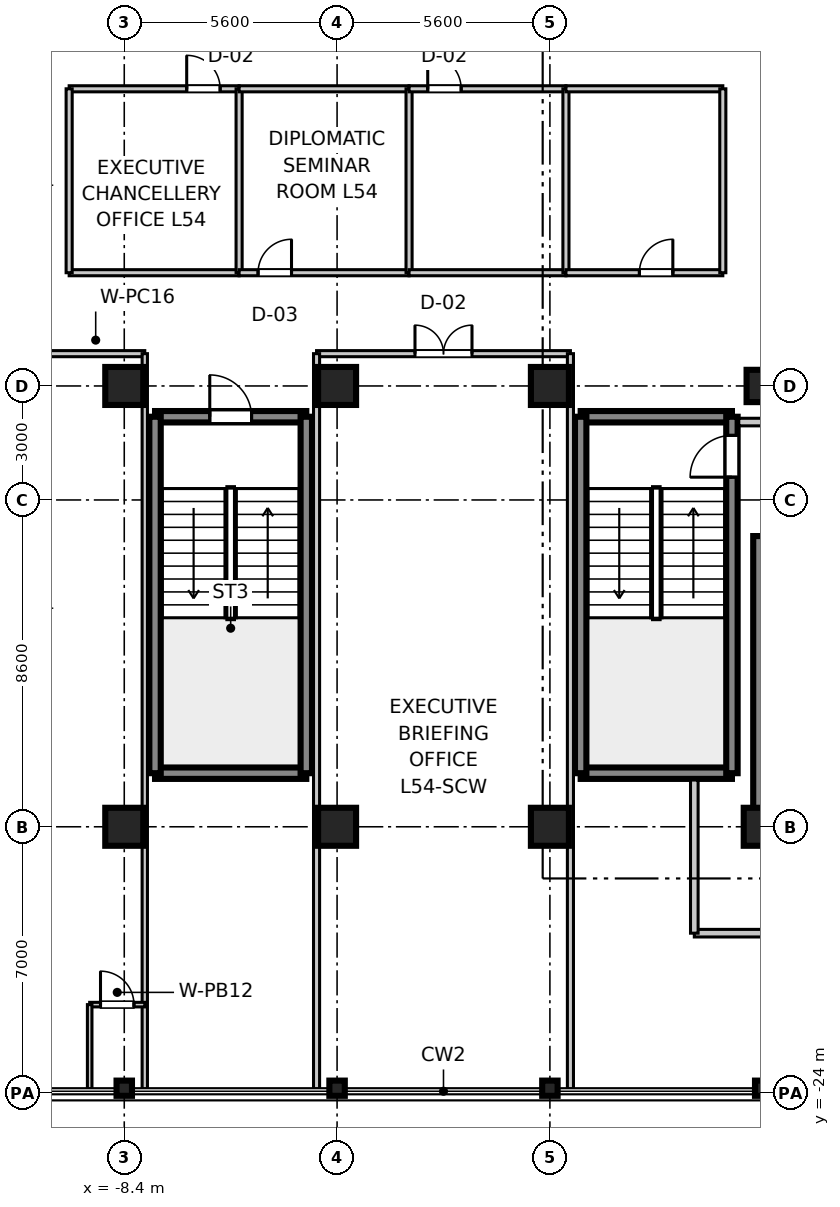
"""IFC4 building model, lengths in metres.
Left out: names, types, materials, properties, quantities, classifications, styles, units other than length and angle.
Written with IfcOpenShell. Run it as: python <this file> out.ifc"""

import sys

from ifc_helpers import new_model, si_unit, direction, frame, frame_2d, origin, origin_2d, place, context, subcontext, project, spatial, rectangle, i_section, extrude, source, transform, mapped, element, fill, save


model = new_model("IFC4")
c1 = context("Model", 3, precision=1e-05, world=origin(), true_north=direction((0.0, 1.0)))
c2 = subcontext(c1, "Body", "Model", "MODEL_VIEW")
j1 = project(units=[si_unit("LENGTHUNIT", "METRE"), si_unit("PLANEANGLEUNIT", "RADIAN")], contexts=[c1])
p1 = place(None, origin())
s1 = spatial("IfcSite", under=j1, at=p1, CompositionType="ELEMENT")
p2 = place(p1, origin())
s2 = spatial("IfcBuilding", under=s1, at=p2, CompositionType="ELEMENT")
p3 = place(p2, frame((0.0, 0.0, 212.3)))
s3 = spatial("IfcBuildingStorey", under=s2, at=p3, CompositionType="ELEMENT", Elevation=212.3)
m1 = source(origin(), c2, "Body", "SweptSolid", [
    extrude(rectangle(XDim=1.0, YDim=1.0, at=origin_2d()), origin(), (0.0, 0.0, 1.0), 3.655),
])
for number, where, z_axis, x_axis in (
    (1, (-8.4, -17.0, 0.0), (0.0, 0.0, 1.0), (1.0, 0.0, 0.0)),
    (2, (-8.4, -5.4, 0.0), (0.0, 0.0, 1.0), (1.0, 0.0, 0.0)),
    (3, (-2.8, -17.0, 0.0), (0.0, 0.0, 1.0), (1.0, 0.0, 0.0)),
    (4, (-2.8, -5.4, 0.0), (0.0, 0.0, 1.0), (1.0, 0.0, 0.0)),
    (5, (2.8, -17.0, 0.0), (0.0, 0.0, 1.0), (1.0, 0.0, 0.0)),
    (6, (2.8, -5.4, 0.0), (0.0, 0.0, 1.0), (1.0, 0.0, 0.0)),
    (7, (8.4, -17.0, 0.0), (0.0, 0.0, 1.0), (1.0, 0.0, 0.0)),
):
    element("IfcColumn", number, at=place(p3, frame(where, z_axis=z_axis, x_axis=x_axis)), inside=s3, PredefinedType="COLUMN", context=c2, shape_type="MappedRepresentation", body=[
        mapped(m1, transform((0.0, 0.0, 0.0), scale=1.0)),
    ])
m2 = source(origin(), c2, "Body", "SweptSolid", [
    extrude(rectangle(XDim=0.85, YDim=0.85, at=origin_2d()), origin(), (0.0, 0.0, 1.0), 3.655),
])
p4 = place(p3, frame((8.4, -5.4, 0.0), z_axis=(0.0, 0.0, 1.0), x_axis=(1.0, 0.0, 0.0)))
e8 = element("IfcColumn", 8, at=p4, inside=s3, PredefinedType="PILASTER", context=c2, shape_type="MappedRepresentation", body=[
    mapped(m2, transform((0.0, 0.0, 0.0), scale=1.0)),
])
m3 = source(origin(), c2, "Body", "SweptSolid", [
    extrude(i_section(OverallWidth=0.401, OverallDepth=0.406, WebThickness=0.016, FlangeThickness=0.025, at=origin_2d()), origin(), (0.0, 0.0, 1.0), 3.655),
])
for number, where, z_axis, x_axis in (
    (9, (-8.4, -23.88, 0.0), (0.0, 0.0, 1.0), (0.0, 1.0, 0.0)),
    (10, (-2.8, -23.88, 0.0), (0.0, 0.0, 1.0), (0.0, 1.0, 0.0)),
    (11, (2.8, -23.88, 0.0), (0.0, 0.0, 1.0), (0.0, 1.0, 0.0)),
    (12, (8.4, -23.88, 0.0), (0.0, 0.0, 1.0), (0.0, 1.0, 0.0)),
):
    element("IfcColumn", number, at=place(p3, frame(where, z_axis=z_axis, x_axis=x_axis)), inside=s3, PredefinedType="COLUMN", context=c2, shape_type="MappedRepresentation", body=[
        mapped(m3, transform((0.0, 0.0, 0.0), scale=1.0)),
    ])
m4 = source(origin(), c2, "Body", "SweptSolid", [
    extrude(rectangle(XDim=7.65, YDim=0.5, at=frame_2d((3.825, 0.0))), origin(), (0.0, 0.0, 1.0), 3.41),
])
p5 = place(p3, frame((8.4, -17.0, 0.0), z_axis=(0.0, 0.0, 1.0), x_axis=(0.0, 1.0, 0.0)))
e13 = element("IfcWall", 13, at=p5, inside=s3, PredefinedType="SHEAR", context=c2, shape_type="MappedRepresentation", body=[
    mapped(m4, transform((0.0, 0.0, 0.0), scale=1.0)),
])
m5 = source(origin(), c2, "Body", "SweptSolid", [
    extrude(rectangle(XDim=3.98, YDim=0.3, at=frame_2d((1.99, 0.0))), origin(), (0.0, 0.0, 1.0), 3.41),
])
for number, where, z_axis, x_axis in (
    (14, (3.61, -15.59, 0.0), (0.0, 0.0, 1.0), (1.0, 0.0, 0.0)),
    (15, (3.61, -6.21, 0.0), (0.0, 0.0, 1.0), (1.0, 0.0, 0.0)),
):
    element("IfcWall", number, at=place(p3, frame(where, z_axis=z_axis, x_axis=x_axis)), inside=s3, PredefinedType="SHEAR", context=c2, shape_type="MappedRepresentation", body=[
        mapped(m5, transform((0.0, 0.0, 0.0), scale=1.0)),
    ])
m6 = source(origin(), c2, "Body", "SweptSolid", [
    extrude(rectangle(XDim=9.38, YDim=0.3, at=frame_2d((4.69, 0.0))), origin(), (0.0, 0.0, 1.0), 3.41),
])
p6 = place(p3, frame((3.61, -15.59, 0.0), z_axis=(0.0, 0.0, 1.0), x_axis=(0.0, 1.0, 0.0)))
e16 = element("IfcWall", 16, at=p6, inside=s3, PredefinedType="SHEAR", context=c2, shape_type="MappedRepresentation", body=[
    mapped(m6, transform((0.0, 0.0, 0.0), scale=1.0)),
])
p7 = place(p3, frame((7.59, -15.59, 0.0), z_axis=(0.0, 0.0, 1.0), x_axis=(0.0, 1.0, 0.0)))
e17 = element("IfcWall", 17, at=p7, inside=s3, PredefinedType="SHEAR", context=c2, shape_type="MappedRepresentation", body=[
    mapped(m6, transform((0.0, 0.0, 0.0), scale=1.0)),
])
p8 = place(p7, frame((7.79, 0.0, 0.0)))
e18 = element("IfcOpeningElement", 18, at=p8, cuts=e17, PredefinedType="OPENING", context=c2, shape_type="SweptSolid", body=[
    extrude(rectangle(XDim=1.1, YDim=2.15, at=frame_2d((0.55, 1.075))), frame((0.0, 0.16, 0.0), z_axis=(0.0, -1.0, 0.0), x_axis=(1.0, 0.0, 0.0)), (0.0, 0.0, 1.0), 0.32),
])
p9 = place(p3, frame((-7.59, -15.59, 0.0), z_axis=(0.0, 0.0, 1.0), x_axis=(1.0, 0.0, 0.0)))
e19 = element("IfcWall", 19, at=p9, inside=s3, PredefinedType="SHEAR", context=c2, shape_type="MappedRepresentation", body=[
    mapped(m5, transform((0.0, 0.0, 0.0), scale=1.0)),
])
p10 = place(p3, frame((-7.59, -6.21, 0.0), z_axis=(0.0, 0.0, 1.0), x_axis=(1.0, 0.0, 0.0)))
e20 = element("IfcWall", 20, at=p10, inside=s3, PredefinedType="SHEAR", context=c2, shape_type="MappedRepresentation", body=[
    mapped(m5, transform((0.0, 0.0, 0.0), scale=1.0)),
])
p11 = place(p10, frame((1.44, 0.0, 0.0)))
e21 = element("IfcOpeningElement", 21, at=p11, cuts=e20, PredefinedType="OPENING", context=c2, shape_type="SweptSolid", body=[
    extrude(rectangle(XDim=1.1, YDim=2.15, at=frame_2d((0.55, 1.075))), frame((0.0, 0.16, 0.0), z_axis=(0.0, -1.0, 0.0), x_axis=(1.0, 0.0, 0.0)), (0.0, 0.0, 1.0), 0.32),
])
for number, where, z_axis, x_axis in (
    (22, (-7.59, -15.59, 0.0), (0.0, 0.0, 1.0), (0.0, 1.0, 0.0)),
    (23, (-3.61, -15.59, 0.0), (0.0, 0.0, 1.0), (0.0, 1.0, 0.0)),
):
    element("IfcWall", number, at=place(p3, frame(where, z_axis=z_axis, x_axis=x_axis)), inside=s3, PredefinedType="SHEAR", context=c2, shape_type="MappedRepresentation", body=[
        mapped(m6, transform((0.0, 0.0, 0.0), scale=1.0)),
    ])
m7 = source(origin(), c2, "Body", "SweptSolid", [
    extrude(rectangle(XDim=5.82, YDim=0.2, at=frame_2d((2.91, 0.0))), origin(), (0.0, 0.0, 1.0), 2.75),
])
p12 = place(p3, frame((6.6, -19.8, 0.0), z_axis=(0.0, 0.0, 1.0), x_axis=(1.0, 0.0, 0.0)))
e24 = element("IfcWall", 24, at=p12, inside=s3, PredefinedType="PARTITIONING", context=c2, shape_type="MappedRepresentation", body=[
    mapped(m7, transform((0.0, 0.0, 0.0), scale=1.0)),
])
m8 = source(origin(), c2, "Body", "SweptSolid", [
    extrude(rectangle(XDim=4.03, YDim=0.2, at=frame_2d((2.015, 0.0))), origin(), (0.0, 0.0, 1.0), 2.75),
])
p13 = place(p3, frame((6.6, -19.8, 0.0), z_axis=(0.0, 0.0, 1.0), x_axis=(0.0, 1.0, 0.0)))
e25 = element("IfcWall", 25, at=p13, inside=s3, PredefinedType="PARTITIONING", context=c2, shape_type="MappedRepresentation", body=[
    mapped(m8, transform((0.0, 0.0, 0.0), scale=1.0)),
])
m9 = source(origin(), c2, "Body", "SweptSolid", [
    extrude(rectangle(XDim=0.97, YDim=0.2, at=frame_2d((0.485, 0.0))), origin(), (0.0, 0.0, 1.0), 2.75),
])
p14 = place(p3, frame((7.77, -6.35, 0.0), z_axis=(0.0, 0.0, 1.0), x_axis=(1.0, 0.0, 0.0)))
e26 = element("IfcWall", 26, at=p14, inside=s3, PredefinedType="PARTITIONING", context=c2, shape_type="MappedRepresentation", body=[
    mapped(m9, transform((0.0, 0.0, 0.0), scale=1.0)),
])
m10 = source(origin(), c2, "Body", "SweptSolid", [
    extrude(rectangle(XDim=4.14, YDim=0.16, at=frame_2d((2.07, 0.0))), origin(), (0.0, 0.0, 1.0), 2.75),
])
p15 = place(p3, frame((-12.0, -4.55, 0.0), z_axis=(0.0, 0.0, 1.0), x_axis=(1.0, 0.0, 0.0)))
e27 = element("IfcWall", 27, at=p15, inside=s3, PredefinedType="PARTITIONING", context=c2, shape_type="MappedRepresentation", body=[
    mapped(m10, transform((0.0, 0.0, 0.0), scale=1.0)),
])
p16 = place(p15, frame((0.457, 0.0, 0.0)))
e28 = element("IfcOpeningElement", 28, at=p16, cuts=e27, PredefinedType="OPENING", context=c2, shape_type="SweptSolid", body=[
    extrude(rectangle(XDim=0.95, YDim=2.1, at=frame_2d((0.475, 1.05))), frame((0.0, 0.09, 0.0), z_axis=(0.0, -1.0, 0.0), x_axis=(1.0, 0.0, 0.0)), (0.0, 0.0, 1.0), 0.18),
])
m11 = source(origin(), c2, "Body", "SweptSolid", [
    extrude(rectangle(XDim=19.35, YDim=0.14, at=frame_2d((9.675, 0.0))), origin(), (0.0, 0.0, 1.0), 2.75),
])
p17 = place(p3, frame((-7.86, -23.9, 0.0), z_axis=(0.0, 0.0, 1.0), x_axis=(0.0, 1.0, 0.0)))
e29 = element("IfcWall", 29, at=p17, inside=s3, PredefinedType="PARTITIONING", context=c2, shape_type="MappedRepresentation", body=[
    mapped(m11, transform((0.0, 0.0, 0.0), scale=1.0)),
])
m12 = source(origin(), c2, "Body", "SweptSolid", [
    extrude(rectangle(XDim=1.45, YDim=0.12, at=frame_2d((0.725, 0.0))), origin(), (0.0, 0.0, 1.0), 2.75),
])
p18 = place(p3, frame((-9.31, -21.68, 0.0), z_axis=(0.0, 0.0, 1.0), x_axis=(1.0, 0.0, 0.0)))
e30 = element("IfcWall", 30, at=p18, inside=s3, PredefinedType="PARTITIONING", context=c2, shape_type="MappedRepresentation", body=[
    mapped(m12, transform((0.0, 0.0, 0.0), scale=1.0)),
])
p19 = place(p18, frame((0.285, 0.0, 0.0)))
e31 = element("IfcOpeningElement", 31, at=p19, cuts=e30, PredefinedType="OPENING", context=c2, shape_type="SweptSolid", body=[
    extrude(rectangle(XDim=0.88, YDim=2.1, at=frame_2d((0.44, 1.05))), frame((0.0, 0.07, 0.0), z_axis=(0.0, -1.0, 0.0), x_axis=(1.0, 0.0, 0.0)), (0.0, 0.0, 1.0), 0.14),
])
m13 = source(origin(), c2, "Body", "SweptSolid", [
    extrude(rectangle(XDim=2.22, YDim=0.12, at=frame_2d((1.11, 0.0))), origin(), (0.0, 0.0, 1.0), 2.75),
])
p20 = place(p3, frame((-9.31, -23.9, 0.0), z_axis=(0.0, 0.0, 1.0), x_axis=(0.0, 1.0, 0.0)))
e32 = element("IfcWall", 32, at=p20, inside=s3, PredefinedType="PARTITIONING", context=c2, shape_type="MappedRepresentation", body=[
    mapped(m13, transform((0.0, 0.0, 0.0), scale=1.0)),
])
m14 = source(origin(), c2, "Body", "SweptSolid", [
    extrude(rectangle(XDim=6.68, YDim=0.16, at=frame_2d((3.34, 0.0))), origin(), (0.0, 0.0, 1.0), 2.75),
])
p21 = place(p3, frame((-3.34, -4.55, 0.0), z_axis=(0.0, 0.0, 1.0), x_axis=(1.0, 0.0, 0.0)))
e33 = element("IfcWall", 33, at=p21, inside=s3, PredefinedType="PARTITIONING", context=c2, shape_type="MappedRepresentation", body=[
    mapped(m14, transform((0.0, 0.0, 0.0), scale=1.0)),
])
p22 = place(p21, frame((2.59, 0.0, 0.0)))
e34 = element("IfcOpeningElement", 34, at=p22, cuts=e33, PredefinedType="OPENING", context=c2, shape_type="SweptSolid", body=[
    extrude(rectangle(XDim=1.5, YDim=2.15, at=frame_2d((0.75, 1.075))), frame((0.0, 0.09, 0.0), z_axis=(0.0, -1.0, 0.0), x_axis=(1.0, 0.0, 0.0)), (0.0, 0.0, 1.0), 0.18),
])
m15 = source(origin(), c2, "Body", "SweptSolid", [
    extrude(rectangle(XDim=19.35, YDim=0.16, at=frame_2d((9.675, 0.0))), origin(), (0.0, 0.0, 1.0), 2.75),
])
for number, where, z_axis, x_axis in (
    (35, (-3.34, -23.9, 0.0), (0.0, 0.0, 1.0), (0.0, 1.0, 0.0)),
    (36, (3.34, -23.9, 0.0), (0.0, 0.0, 1.0), (0.0, 1.0, 0.0)),
):
    element("IfcWall", number, at=place(p3, frame(where, z_axis=z_axis, x_axis=x_axis)), inside=s3, PredefinedType="PARTITIONING", context=c2, shape_type="MappedRepresentation", body=[
        mapped(m15, transform((0.0, 0.0, 0.0), scale=1.0)),
    ])
m16 = source(origin(), c2, "Body", "SweptSolid", [
    extrude(rectangle(XDim=4.472, YDim=0.16, at=frame_2d((2.236, 0.0))), origin(), (0.0, 0.0, 1.0), 2.75),
])
p23 = place(p3, frame((-9.85, -2.42, 0.0), z_axis=(0.0, 0.0, 1.0), x_axis=(1.0, 0.0, 0.0)))
e37 = element("IfcWall", 37, at=p23, inside=s3, PredefinedType="PARTITIONING", context=c2, shape_type="MappedRepresentation", body=[
    mapped(m16, transform((0.0, 0.0, 0.0), scale=1.0)),
])
p24 = place(p3, frame((-9.85, 2.42, 0.0), z_axis=(0.0, 0.0, 1.0), x_axis=(1.0, 0.0, 0.0)))
e38 = element("IfcWall", 38, at=p24, inside=s3, PredefinedType="PARTITIONING", context=c2, shape_type="MappedRepresentation", body=[
    mapped(m16, transform((0.0, 0.0, 0.0), scale=1.0)),
])
p25 = place(p24, frame((3.093, 0.0, 0.0)))
e39 = element("IfcOpeningElement", 39, at=p25, cuts=e38, PredefinedType="OPENING", context=c2, shape_type="SweptSolid", body=[
    extrude(rectangle(XDim=0.88, YDim=2.1, at=frame_2d((0.44, 1.05))), frame((0.0, 0.09, 0.0), z_axis=(0.0, -1.0, 0.0), x_axis=(1.0, 0.0, 0.0)), (0.0, 0.0, 1.0), 0.18),
])
m17 = source(origin(), c2, "Body", "SweptSolid", [
    extrude(rectangle(XDim=4.84, YDim=0.16, at=frame_2d((2.42, 0.0))), origin(), (0.0, 0.0, 1.0), 2.75),
])
for number, where, z_axis, x_axis in (
    (40, (-9.85, -2.42, 0.0), (0.0, 0.0, 1.0), (0.0, 1.0, 0.0)),
    (41, (-5.378, -2.42, 0.0), (0.0, 0.0, 1.0), (0.0, 1.0, 0.0)),
):
    element("IfcWall", number, at=place(p3, frame(where, z_axis=z_axis, x_axis=x_axis)), inside=s3, PredefinedType="PARTITIONING", context=c2, shape_type="MappedRepresentation", body=[
        mapped(m17, transform((0.0, 0.0, 0.0), scale=1.0)),
    ])
m18 = source(origin(), c2, "Body", "SweptSolid", [
    extrude(rectangle(XDim=4.472, YDim=0.16, at=frame_2d((2.236, 0.0))), origin(), (0.0, 0.0, 1.0), 2.75),
])
p26 = place(p3, frame((-5.378, -2.42, 0.0), z_axis=(0.0, 0.0, 1.0), x_axis=(1.0, 0.0, 0.0)))
e42 = element("IfcWall", 42, at=p26, inside=s3, PredefinedType="PARTITIONING", context=c2, shape_type="MappedRepresentation", body=[
    mapped(m18, transform((0.0, 0.0, 0.0), scale=1.0)),
])
p27 = place(p26, frame((0.499, 0.0, 0.0)))
e43 = element("IfcOpeningElement", 43, at=p27, cuts=e42, PredefinedType="OPENING", context=c2, shape_type="SweptSolid", body=[
    extrude(rectangle(XDim=0.88, YDim=2.1, at=frame_2d((0.44, 1.05))), frame((0.0, 0.09, 0.0), z_axis=(0.0, -1.0, 0.0), x_axis=(1.0, 0.0, 0.0)), (0.0, 0.0, 1.0), 0.18),
])
p28 = place(p3, frame((-5.378, 2.42, 0.0), z_axis=(0.0, 0.0, 1.0), x_axis=(1.0, 0.0, 0.0)))
e44 = element("IfcWall", 44, at=p28, inside=s3, PredefinedType="PARTITIONING", context=c2, shape_type="MappedRepresentation", body=[
    mapped(m18, transform((0.0, 0.0, 0.0), scale=1.0)),
])
p29 = place(p3, frame((-0.906, -2.42, 0.0), z_axis=(0.0, 0.0, 1.0), x_axis=(0.0, 1.0, 0.0)))
e45 = element("IfcWall", 45, at=p29, inside=s3, PredefinedType="PARTITIONING", context=c2, shape_type="MappedRepresentation", body=[
    mapped(m17, transform((0.0, 0.0, 0.0), scale=1.0)),
])
m19 = source(origin(), c2, "Body", "SweptSolid", [
    extrude(rectangle(XDim=4.128, YDim=0.16, at=frame_2d((2.064, 0.0))), origin(), (0.0, 0.0, 1.0), 2.75),
])
p30 = place(p3, frame((-0.906, -2.42, 0.0), z_axis=(0.0, 0.0, 1.0), x_axis=(1.0, 0.0, 0.0)))
e46 = element("IfcWall", 46, at=p30, inside=s3, PredefinedType="PARTITIONING", context=c2, shape_type="MappedRepresentation", body=[
    mapped(m19, transform((0.0, 0.0, 0.0), scale=1.0)),
])
p31 = place(p3, frame((-0.906, 2.42, 0.0), z_axis=(0.0, 0.0, 1.0), x_axis=(1.0, 0.0, 0.0)))
e47 = element("IfcWall", 47, at=p31, inside=s3, PredefinedType="PARTITIONING", context=c2, shape_type="MappedRepresentation", body=[
    mapped(m19, transform((0.0, 0.0, 0.0), scale=1.0)),
])
p32 = place(p31, frame((0.491, 0.0, 0.0)))
e48 = element("IfcOpeningElement", 48, at=p32, cuts=e47, PredefinedType="OPENING", context=c2, shape_type="SweptSolid", body=[
    extrude(rectangle(XDim=0.88, YDim=2.1, at=frame_2d((0.44, 1.05))), frame((0.0, 0.09, 0.0), z_axis=(0.0, -1.0, 0.0), x_axis=(1.0, 0.0, 0.0)), (0.0, 0.0, 1.0), 0.18),
])
p33 = place(p3, frame((3.222, -2.42, 0.0), z_axis=(0.0, 0.0, 1.0), x_axis=(0.0, 1.0, 0.0)))
e49 = element("IfcWall", 49, at=p33, inside=s3, PredefinedType="PARTITIONING", context=c2, shape_type="MappedRepresentation", body=[
    mapped(m17, transform((0.0, 0.0, 0.0), scale=1.0)),
])
m20 = source(origin(), c2, "Body", "SweptSolid", [
    extrude(rectangle(XDim=4.128, YDim=0.16, at=frame_2d((2.064, 0.0))), origin(), (0.0, 0.0, 1.0), 2.75),
])
p34 = place(p3, frame((3.222, -2.42, 0.0), z_axis=(0.0, 0.0, 1.0), x_axis=(1.0, 0.0, 0.0)))
e50 = element("IfcWall", 50, at=p34, inside=s3, PredefinedType="PARTITIONING", context=c2, shape_type="MappedRepresentation", body=[
    mapped(m20, transform((0.0, 0.0, 0.0), scale=1.0)),
])
p35 = place(p34, frame((1.933, 0.0, 0.0)))
e51 = element("IfcOpeningElement", 51, at=p35, cuts=e50, PredefinedType="OPENING", context=c2, shape_type="SweptSolid", body=[
    extrude(rectangle(XDim=0.88, YDim=2.1, at=frame_2d((0.44, 1.05))), frame((0.0, 0.09, 0.0), z_axis=(0.0, -1.0, 0.0), x_axis=(1.0, 0.0, 0.0)), (0.0, 0.0, 1.0), 0.18),
])
p36 = place(p3, frame((3.222, 2.42, 0.0), z_axis=(0.0, 0.0, 1.0), x_axis=(1.0, 0.0, 0.0)))
e52 = element("IfcWall", 52, at=p36, inside=s3, PredefinedType="PARTITIONING", context=c2, shape_type="MappedRepresentation", body=[
    mapped(m20, transform((0.0, 0.0, 0.0), scale=1.0)),
])
p37 = place(p3, frame((7.35, -2.42, 0.0), z_axis=(0.0, 0.0, 1.0), x_axis=(0.0, 1.0, 0.0)))
e53 = element("IfcWall", 53, at=p37, inside=s3, PredefinedType="PARTITIONING", context=c2, shape_type="MappedRepresentation", body=[
    mapped(m17, transform((0.0, 0.0, 0.0), scale=1.0)),
])
m21 = source(origin(), c2, "Body", "SweptSolid", [
    extrude(rectangle(XDim=1.1, YDim=2.15, at=frame_2d((0.55, 1.075))), frame((0.0, 0.025, 0.0), z_axis=(0.0, -1.0, 0.0), x_axis=(1.0, 0.0, 0.0)), (0.0, 0.0, 1.0), 0.05),
])
p38 = place(p8, origin())
e54 = element("IfcDoor", 54, at=p38, inside=s3, OperationType="SINGLE_SWING_LEFT", PredefinedType="DOOR", context=c2, shape_type="MappedRepresentation", body=[
    mapped(m21, transform((0.0, 0.0, 0.0), scale=1.0)),
])
fill(e18, e54)
p39 = place(p11, frame((1.1, 0.0, 0.0), z_axis=(0.0, 0.0, 1.0), x_axis=(-1.0, 0.0, 0.0)))
e55 = element("IfcDoor", 55, at=p39, inside=s3, OperationType="SINGLE_SWING_LEFT", PredefinedType="DOOR", context=c2, shape_type="MappedRepresentation", body=[
    mapped(m21, transform((0.0, 0.0, 0.0), scale=1.0)),
])
fill(e21, e55)
m22 = source(origin(), c2, "Body", "SweptSolid", [
    extrude(rectangle(XDim=0.88, YDim=2.1, at=frame_2d((0.44, 1.05))), frame((0.0, 0.025, 0.0), z_axis=(0.0, -1.0, 0.0), x_axis=(1.0, 0.0, 0.0)), (0.0, 0.0, 1.0), 0.05),
])
p40 = place(p19, frame((0.88, 0.0, 0.0), z_axis=(0.0, 0.0, 1.0), x_axis=(-1.0, 0.0, 0.0)))
e56 = element("IfcDoor", 56, at=p40, inside=s3, OperationType="SINGLE_SWING_LEFT", PredefinedType="DOOR", context=c2, shape_type="MappedRepresentation", body=[
    mapped(m22, transform((0.0, 0.0, 0.0), scale=1.0)),
])
fill(e31, e56)
m23 = source(origin(), c2, "Body", "SweptSolid", [
    extrude(rectangle(XDim=1.5, YDim=2.15, at=frame_2d((0.75, 1.075))), frame((0.0, 0.025, 0.0), z_axis=(0.0, -1.0, 0.0), x_axis=(1.0, 0.0, 0.0)), (0.0, 0.0, 1.0), 0.05),
])
p41 = place(p22, frame((1.5, 0.0, 0.0), z_axis=(0.0, 0.0, 1.0), x_axis=(-1.0, 0.0, 0.0)))
e57 = element("IfcDoor", 57, at=p41, inside=s3, OperationType="DOUBLE_DOOR_SINGLE_SWING", PredefinedType="DOOR", context=c2, shape_type="MappedRepresentation", body=[
    mapped(m23, transform((0.0, 0.0, 0.0), scale=1.0)),
])
fill(e34, e57)
p42 = place(p25, frame((0.88, 0.0, 0.0), z_axis=(0.0, 0.0, 1.0), x_axis=(-1.0, 0.0, 0.0)))
e58 = element("IfcDoor", 58, at=p42, inside=s3, OperationType="SINGLE_SWING_LEFT", PredefinedType="DOOR", context=c2, shape_type="MappedRepresentation", body=[
    mapped(m22, transform((0.0, 0.0, 0.0), scale=1.0)),
])
fill(e39, e58)
p43 = place(p27, origin())
e59 = element("IfcDoor", 59, at=p43, inside=s3, OperationType="SINGLE_SWING_RIGHT", PredefinedType="DOOR", context=c2, shape_type="MappedRepresentation", body=[
    mapped(m22, transform((0.0, 0.0, 0.0), scale=1.0)),
])
fill(e43, e59)
p44 = place(p32, frame((0.88, 0.0, 0.0), z_axis=(0.0, 0.0, 1.0), x_axis=(-1.0, 0.0, 0.0)))
e60 = element("IfcDoor", 60, at=p44, inside=s3, OperationType="SINGLE_SWING_LEFT", PredefinedType="DOOR", context=c2, shape_type="MappedRepresentation", body=[
    mapped(m22, transform((0.0, 0.0, 0.0), scale=1.0)),
])
fill(e48, e60)
p45 = place(p35, origin())
e61 = element("IfcDoor", 61, at=p45, inside=s3, OperationType="SINGLE_SWING_RIGHT", PredefinedType="DOOR", context=c2, shape_type="MappedRepresentation", body=[
    mapped(m22, transform((0.0, 0.0, 0.0), scale=1.0)),
])
fill(e51, e61)
save(model, sys.argv[1])
